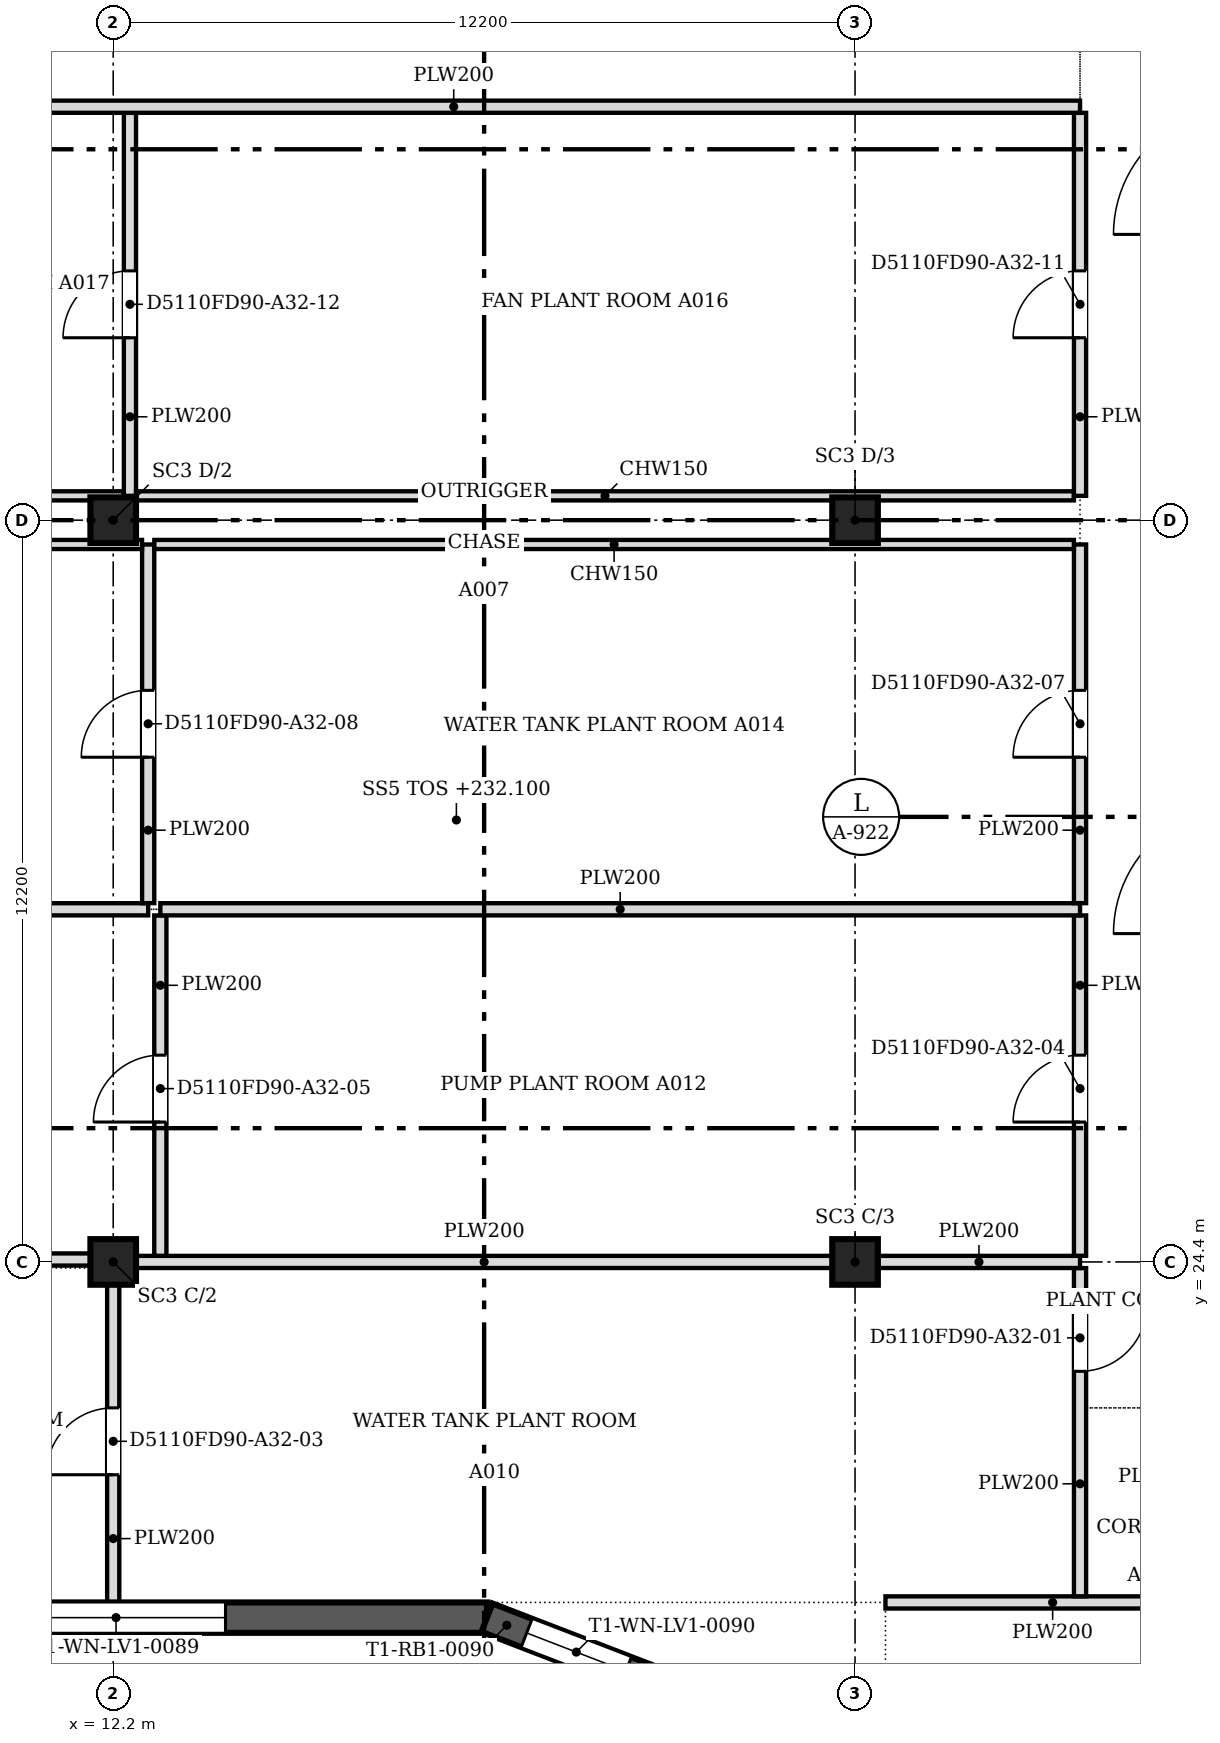
"""IFC4 building model, lengths in metres.
Left out: names, types, materials, properties, quantities, classifications, styles, units other than length and angle.
Written with IfcOpenShell. Run it as: python <this file> out.ifc"""

import sys

from ifc_helpers import new_model, si_unit, direction, frame, frame_2d, origin, origin_2d, place, context, subcontext, project, spatial, polyline, rectangle, outline, extrude, faceted_brep, source, transform, mapped, element, fill, save


model = new_model("IFC4")
c1 = context("Model", 3, precision=1e-05, world=origin(), true_north=direction((0.0, 1.0)))
c2 = subcontext(c1, "Body", "Model", "MODEL_VIEW")
j1 = project(units=[si_unit("LENGTHUNIT", "METRE"), si_unit("PLANEANGLEUNIT", "RADIAN")], contexts=[c1])
p1 = place(None, origin())
s1 = spatial("IfcSite", under=j1, at=p1, CompositionType="ELEMENT")
p2 = place(p1, origin())
s2 = spatial("IfcBuilding", under=s1, at=p2, CompositionType="ELEMENT")
p3 = place(p2, frame((0.0, 0.0, 232.1)))
s3 = spatial("IfcBuildingStorey", under=s2, at=p3, CompositionType="ELEMENT", Elevation=232.1)
for number, where, z_axis, x_axis in (
    (1, (12.2, 24.4, 0.0), (0.0, 0.0, 1.0), (1.0, 0.0, 0.0)),
    (2, (12.2, 36.6, 0.0), (0.0, 0.0, 1.0), (1.0, 0.0, 0.0)),
    (3, (24.4, 24.4, 0.0), (0.0, 0.0, 1.0), (1.0, 0.0, 0.0)),
    (4, (24.4, 36.6, 0.0), (0.0, 0.0, 1.0), (1.0, 0.0, 0.0)),
):
    element("IfcColumn", number, at=place(p3, frame(where, z_axis=z_axis, x_axis=x_axis)), inside=s3, PredefinedType="COLUMN", context=c2, shape_type="SweptSolid", body=[
        extrude(rectangle(XDim=0.75, YDim=0.75, at=origin_2d()), origin(), (0.0, 0.0, 1.0), 4.6),
    ])
m1 = source(origin(), c2, "Body", "Brep", [
    faceted_brep([(0.0, -0.25, 0.0), (12.154, -0.25, 0.0), (12.154, -0.25, 4.8), (0.0, -0.25, 4.8), (0.047, 0.25, 4.8), (12.2, 0.25, 4.8), (12.2, 0.25, 0.0), (0.047, 0.25, 0.0), (12.2, -0.0, 0.0), (0.0, 0.0, 0.0), (12.2, -0.0, 4.8), (0.0, 0.0, 4.8)], [[[0, 1, 2, 3]], [[4, 5, 6, 7]], [[7, 6, 8, 1, 0, 9]], [[6, 5, 10, 8]], [[5, 4, 11, 3, 2, 10]], [[9, 0, 3, 11]], [[7, 9, 11, 4]], [[1, 8, 10, 2]]]),
])
p4 = place(p3, frame((6.146, 18.55, 0.0), z_axis=(0.0, 0.0, 1.0), x_axis=(1.0, 0.0, 0.0)))
e5 = element("IfcWall", 5, at=p4, inside=s3, PredefinedType="SOLIDWALL", context=c2, shape_type="MappedRepresentation", body=[
    mapped(m1, transform((0.0, 0.0, 0.0), scale=1.0)),
])
m2 = source(origin(), c2, "Body", "SweptSolid", [
    extrude(outline(polyline([(4.3, 0.8), (7.9, 0.8), (7.9, 4.0), (4.3, 4.0), (4.3, 0.8)])), frame((0.0, 0.26, 0.0), z_axis=(0.0, -1.0, 0.0), x_axis=(1.0, 0.0, 0.0)), (0.0, 0.0, 1.0), 0.52),
])
p5 = place(p4, origin())
e6 = element("IfcOpeningElement", 6, at=p5, cuts=e5, PredefinedType="OPENING", context=c2, shape_type="MappedRepresentation", body=[
    mapped(m2, transform((0.0, 0.0, 0.0), scale=1.0)),
])
m3 = source(origin(), c2, "Body", "Brep", [
    faceted_brep([(0.047, -0.25, 0.0), (3.096, -0.25, 0.0), (3.096, -0.25, 4.8), (0.047, -0.25, 4.8), (0.0, 0.25, 4.8), (3.149, 0.25, 4.8), (3.149, 0.25, 0.0), (0.0, 0.25, 0.0), (3.149, -0.0, 0.0), (0.0, 0.0, 0.0), (3.149, -0.0, 4.8), (0.0, 0.0, 4.8)], [[[0, 1, 2, 3]], [[4, 5, 6, 7]], [[7, 6, 8, 1, 0, 9]], [[6, 5, 10, 8]], [[5, 4, 11, 3, 2, 10]], [[4, 7, 9, 11]], [[9, 0, 3, 11]], [[1, 8, 10, 2]]]),
])
p6 = place(p3, frame((18.346, 18.55, 0.0), z_axis=(0.0, 0.0, 1.0), x_axis=(0.932987528699, -0.35990869855, 0.0)))
e7 = element("IfcWall", 7, at=p6, inside=s3, PredefinedType="SOLIDWALL", context=c2, shape_type="MappedRepresentation", body=[
    mapped(m3, transform((0.0, 0.0, 0.0), scale=1.0)),
])
m4 = source(origin(), c2, "Body", "SweptSolid", [
    extrude(outline(polyline([(0.7, 0.8), (2.449, 0.8), (2.449, 4.0), (0.7, 4.0), (0.7, 0.8)])), frame((0.0, 0.26, 0.0), z_axis=(0.0, -1.0, 0.0), x_axis=(1.0, 0.0, 0.0)), (0.0, 0.0, 1.0), 0.52),
])
p7 = place(p6, origin())
e8 = element("IfcOpeningElement", 8, at=p7, cuts=e7, PredefinedType="OPENING", context=c2, shape_type="MappedRepresentation", body=[
    mapped(m4, transform((0.0, 0.0, 0.0), scale=1.0)),
])
p8 = place(p3, frame((12.2, 18.8, 0.0), z_axis=(0.0, 0.0, 1.0), x_axis=(0.0, 1.0, 0.0)))
e9 = element("IfcWall", 9, at=p8, inside=s3, PredefinedType="PARTITIONING", context=c2, shape_type="SweptSolid", body=[
    extrude(rectangle(XDim=5.224, YDim=0.2, at=frame_2d((2.612, 0.0))), origin(), (0.0, 0.0, 1.0), 3.817),
])
m5 = source(origin(), c2, "Body", "SweptSolid", [
    extrude(rectangle(XDim=1.1, YDim=2.1, at=frame_2d((0.55, 1.05))), frame((0.0, 0.11, 0.0), z_axis=(0.0, -1.0, 0.0), x_axis=(1.0, 0.0, 0.0)), (0.0, 0.0, 1.0), 0.22),
])
p9 = place(p8, frame((2.1, 0.0, 0.0)))
e10 = element("IfcOpeningElement", 10, at=p9, cuts=e9, PredefinedType="OPENING", context=c2, shape_type="MappedRepresentation", body=[
    mapped(m5, transform((0.0, 0.0, 0.0), scale=1.0)),
])
p10 = place(p3, frame((24.9, 18.8, 0.0), z_axis=(0.0, 0.0, 1.0), x_axis=(1.0, 0.0, 0.0)))
e11 = element("IfcWall", 11, at=p10, inside=s3, PredefinedType="PARTITIONING", context=c2, shape_type="SweptSolid", body=[
    extrude(rectangle(XDim=5.499, YDim=0.2, at=frame_2d((2.75, 0.0))), origin(), (0.0, 0.0, 1.0), 3.817),
])
p11 = place(p3, frame((28.1, 18.901, 0.0), z_axis=(0.0, 0.0, 1.0), x_axis=(0.0, 1.0, 0.0)))
e12 = element("IfcWall", 12, at=p11, inside=s3, PredefinedType="PARTITIONING", context=c2, shape_type="SweptSolid", body=[
    extrude(rectangle(XDim=5.398, YDim=0.2, at=frame_2d((2.699, 0.0))), origin(), (0.0, 0.0, 1.0), 3.817),
])
p12 = place(p11, frame((3.7, 0.0, 0.0)))
e13 = element("IfcOpeningElement", 13, at=p12, cuts=e12, PredefinedType="OPENING", context=c2, shape_type="MappedRepresentation", body=[
    mapped(m5, transform((0.0, 0.0, 0.0), scale=1.0)),
])
p13 = place(p3, frame((0.536, 24.44, 0.0), z_axis=(0.0, 0.0, 1.0), x_axis=(1.0, 0.0, 0.0)))
e14 = element("IfcWall", 14, at=p13, inside=s3, PredefinedType="PARTITIONING", context=c2, shape_type="SweptSolid", body=[
    extrude(rectangle(XDim=11.288, YDim=0.2, at=frame_2d((5.644, 0.0))), origin(), (0.0, 0.0, 1.0), 3.817),
])
p14 = place(p3, frame((12.576, 24.4, 0.0), z_axis=(0.0, 0.0, 1.0), x_axis=(1.0, 0.0, 0.0)))
e15 = element("IfcWall", 15, at=p14, inside=s3, PredefinedType="PARTITIONING", context=c2, shape_type="SweptSolid", body=[
    extrude(rectangle(XDim=11.448, YDim=0.2, at=frame_2d((5.724, 0.0))), origin(), (0.0, 0.0, 1.0), 3.817),
])
p15 = place(p3, frame((24.776, 24.4, 0.0), z_axis=(0.0, 0.0, 1.0), x_axis=(1.0, 0.0, 0.0)))
e16 = element("IfcWall", 16, at=p15, inside=s3, PredefinedType="PARTITIONING", context=c2, shape_type="SweptSolid", body=[
    extrude(rectangle(XDim=3.324, YDim=0.2, at=frame_2d((1.662, 0.0))), origin(), (0.0, 0.0, 1.0), 3.817),
])
p16 = place(p3, frame((12.975, 24.501, 0.0), z_axis=(0.0, 0.0, 1.0), x_axis=(0.0, 1.0, 0.0)))
e17 = element("IfcWall", 17, at=p16, inside=s3, PredefinedType="PARTITIONING", context=c2, shape_type="SweptSolid", body=[
    extrude(rectangle(XDim=5.598, YDim=0.2, at=frame_2d((2.799, 0.0))), origin(), (0.0, 0.0, 1.0), 3.817),
])
p17 = place(p16, frame((2.2, 0.0, 0.0)))
e18 = element("IfcOpeningElement", 18, at=p17, cuts=e17, PredefinedType="OPENING", context=c2, shape_type="MappedRepresentation", body=[
    mapped(m5, transform((0.0, 0.0, 0.0), scale=1.0)),
])
p18 = place(p3, frame((28.1, 24.501, 0.0), z_axis=(0.0, 0.0, 1.0), x_axis=(0.0, 1.0, 0.0)))
e19 = element("IfcWall", 19, at=p18, inside=s3, PredefinedType="PARTITIONING", context=c2, shape_type="SweptSolid", body=[
    extrude(rectangle(XDim=5.598, YDim=0.2, at=frame_2d((2.799, 0.0))), origin(), (0.0, 0.0, 1.0), 3.817),
])
p19 = place(p18, frame((2.2, 0.0, 0.0)))
e20 = element("IfcOpeningElement", 20, at=p19, cuts=e19, PredefinedType="OPENING", context=c2, shape_type="MappedRepresentation", body=[
    mapped(m5, transform((0.0, 0.0, 0.0), scale=1.0)),
])
p20 = place(p3, frame((0.5, 30.2, 0.0), z_axis=(0.0, 0.0, 1.0), x_axis=(1.0, 0.0, 0.0)))
e21 = element("IfcWall", 21, at=p20, inside=s3, PredefinedType="PARTITIONING", context=c2, shape_type="SweptSolid", body=[
    extrude(rectangle(XDim=12.275, YDim=0.2, at=frame_2d((6.137, 0.0))), origin(), (0.0, 0.0, 1.0), 3.817),
])
p21 = place(p3, frame((12.975, 30.2, 0.0), z_axis=(0.0, 0.0, 1.0), x_axis=(1.0, 0.0, 0.0)))
e22 = element("IfcWall", 22, at=p21, inside=s3, PredefinedType="PARTITIONING", context=c2, shape_type="SweptSolid", body=[
    extrude(rectangle(XDim=15.125, YDim=0.2, at=frame_2d((7.562, 0.0))), origin(), (0.0, 0.0, 1.0), 3.817),
])
p22 = place(p3, frame((12.775, 30.301, 0.0), z_axis=(0.0, 0.0, 1.0), x_axis=(0.0, 1.0, 0.0)))
e23 = element("IfcWall", 23, at=p22, inside=s3, PredefinedType="PARTITIONING", context=c2, shape_type="SweptSolid", body=[
    extrude(rectangle(XDim=5.899, YDim=0.2, at=frame_2d((2.949, 0.0))), origin(), (0.0, 0.0, 1.0), 3.817),
])
p23 = place(p22, frame((2.4, 0.0, 0.0)))
e24 = element("IfcOpeningElement", 24, at=p23, cuts=e23, PredefinedType="OPENING", context=c2, shape_type="MappedRepresentation", body=[
    mapped(m5, transform((0.0, 0.0, 0.0), scale=1.0)),
])
p24 = place(p3, frame((28.1, 30.301, 0.0), z_axis=(0.0, 0.0, 1.0), x_axis=(0.0, 1.0, 0.0)))
e25 = element("IfcWall", 25, at=p24, inside=s3, PredefinedType="PARTITIONING", context=c2, shape_type="SweptSolid", body=[
    extrude(rectangle(XDim=5.899, YDim=0.2, at=frame_2d((2.949, 0.0))), origin(), (0.0, 0.0, 1.0), 3.817),
])
p25 = place(p24, frame((2.4, 0.0, 0.0)))
e26 = element("IfcOpeningElement", 26, at=p25, cuts=e25, PredefinedType="OPENING", context=c2, shape_type="MappedRepresentation", body=[
    mapped(m5, transform((0.0, 0.0, 0.0), scale=1.0)),
])
p26 = place(p3, frame((0.5, 36.2, 0.0), z_axis=(0.0, 0.0, 1.0), x_axis=(1.0, 0.0, 0.0)))
e27 = element("IfcWall", 27, at=p26, inside=s3, PredefinedType="PARTITIONING", context=c2, shape_type="SweptSolid", body=[
    extrude(rectangle(XDim=12.174, YDim=0.15, at=frame_2d((6.087, 0.0))), origin(), (0.0, 0.0, 1.0), 3.817),
])
p27 = place(p3, frame((12.876, 36.2, 0.0), z_axis=(0.0, 0.0, 1.0), x_axis=(1.0, 0.0, 0.0)))
e28 = element("IfcWall", 28, at=p27, inside=s3, PredefinedType="PARTITIONING", context=c2, shape_type="SweptSolid", body=[
    extrude(rectangle(XDim=15.123, YDim=0.15, at=frame_2d((7.562, 0.0))), origin(), (0.0, 0.0, 1.0), 3.817),
])
p28 = place(p3, frame((0.5, 37.0, 0.0), z_axis=(0.0, 0.0, 1.0), x_axis=(1.0, 0.0, 0.0)))
e29 = element("IfcWall", 29, at=p28, inside=s3, PredefinedType="PARTITIONING", context=c2, shape_type="SweptSolid", body=[
    extrude(rectangle(XDim=11.874, YDim=0.15, at=frame_2d((5.937, 0.0))), origin(), (0.0, 0.0, 1.0), 3.817),
])
p29 = place(p3, frame((12.475, 37.0, 0.0), z_axis=(0.0, 0.0, 1.0), x_axis=(0.0, 1.0, 0.0)))
e30 = element("IfcWall", 30, at=p29, inside=s3, PredefinedType="PARTITIONING", context=c2, shape_type="SweptSolid", body=[
    extrude(rectangle(XDim=6.299, YDim=0.2, at=frame_2d((3.149, 0.0))), origin(), (0.0, 0.0, 1.0), 3.817),
])
p30 = place(p29, frame((2.6, 0.0, 0.0)))
e31 = element("IfcOpeningElement", 31, at=p30, cuts=e30, PredefinedType="OPENING", context=c2, shape_type="MappedRepresentation", body=[
    mapped(m5, transform((0.0, 0.0, 0.0), scale=1.0)),
])
p31 = place(p3, frame((12.576, 37.0, 0.0), z_axis=(0.0, 0.0, 1.0), x_axis=(1.0, 0.0, 0.0)))
e32 = element("IfcWall", 32, at=p31, inside=s3, PredefinedType="PARTITIONING", context=c2, shape_type="SweptSolid", body=[
    extrude(rectangle(XDim=15.423, YDim=0.15, at=frame_2d((7.711, 0.0))), origin(), (0.0, 0.0, 1.0), 3.817),
])
p32 = place(p3, frame((28.1, 37.0, 0.0), z_axis=(0.0, 0.0, 1.0), x_axis=(0.0, 1.0, 0.0)))
e33 = element("IfcWall", 33, at=p32, inside=s3, PredefinedType="PARTITIONING", context=c2, shape_type="SweptSolid", body=[
    extrude(rectangle(XDim=6.299, YDim=0.2, at=frame_2d((3.149, 0.0))), origin(), (0.0, 0.0, 1.0), 3.817),
])
p33 = place(p32, frame((2.6, 0.0, 0.0)))
e34 = element("IfcOpeningElement", 34, at=p33, cuts=e33, PredefinedType="OPENING", context=c2, shape_type="MappedRepresentation", body=[
    mapped(m5, transform((0.0, 0.0, 0.0), scale=1.0)),
])
p34 = place(p3, frame((7.5, 43.4, 0.0), z_axis=(0.0, 0.0, 1.0), x_axis=(1.0, 0.0, 0.0)))
e35 = element("IfcWall", 35, at=p34, inside=s3, PredefinedType="PARTITIONING", context=c2, shape_type="SweptSolid", body=[
    extrude(rectangle(XDim=20.6, YDim=0.2, at=frame_2d((10.3, 0.0))), origin(), (0.0, 0.0, 1.0), 3.817),
])
m6 = source(origin(), c2, "Body", "SweptSolid", [
    extrude(outline(polyline([(4.3, 0.8), (7.9, 0.8), (7.9, 4.0), (4.3, 4.0), (4.3, 0.8)])), frame((0.0, 0.03, 0.0), z_axis=(0.0, -1.0, 0.0), x_axis=(1.0, 0.0, 0.0)), (0.0, 0.0, 1.0), 0.06),
])
p35 = place(p5, origin())
e36 = element("IfcWindow", 36, at=p35, inside=s3, PartitioningType="USERDEFINED", PredefinedType="WINDOW", context=c2, shape_type="MappedRepresentation", body=[
    mapped(m6, transform((0.0, 0.0, 0.0), scale=1.0)),
])
fill(e6, e36)
m7 = source(origin(), c2, "Body", "SweptSolid", [
    extrude(outline(polyline([(0.7, 0.8), (2.449, 0.8), (2.449, 4.0), (0.7, 4.0), (0.7, 0.8)])), frame((0.0, 0.03, 0.0), z_axis=(0.0, -1.0, 0.0), x_axis=(1.0, 0.0, 0.0)), (0.0, 0.0, 1.0), 0.06),
])
p36 = place(p7, origin())
e37 = element("IfcWindow", 37, at=p36, inside=s3, PartitioningType="USERDEFINED", PredefinedType="WINDOW", context=c2, shape_type="MappedRepresentation", body=[
    mapped(m7, transform((0.0, 0.0, 0.0), scale=1.0)),
])
fill(e8, e37)
m8 = source(origin(), c2, "Body", "SweptSolid", [
    extrude(rectangle(XDim=1.1, YDim=2.1, at=frame_2d((0.55, 1.05))), frame((0.0, 0.025, 0.0), z_axis=(0.0, -1.0, 0.0), x_axis=(1.0, 0.0, 0.0)), (0.0, 0.0, 1.0), 0.05),
])
p37 = place(p12, origin())
e38 = element("IfcDoor", 38, at=p37, inside=s3, OperationType="SINGLE_SWING_RIGHT", PredefinedType="DOOR", context=c2, shape_type="MappedRepresentation", body=[
    mapped(m8, transform((0.0, 0.0, 0.0), scale=1.0)),
])
fill(e13, e38)
p38 = place(p9, origin())
e39 = element("IfcDoor", 39, at=p38, inside=s3, OperationType="SINGLE_SWING_LEFT", PredefinedType="DOOR", context=c2, shape_type="MappedRepresentation", body=[
    mapped(m8, transform((0.0, 0.0, 0.0), scale=1.0)),
])
fill(e10, e39)
p39 = place(p19, origin())
e40 = element("IfcDoor", 40, at=p39, inside=s3, OperationType="SINGLE_SWING_LEFT", PredefinedType="DOOR", context=c2, shape_type="MappedRepresentation", body=[
    mapped(m8, transform((0.0, 0.0, 0.0), scale=1.0)),
])
fill(e20, e40)
p40 = place(p17, origin())
e41 = element("IfcDoor", 41, at=p40, inside=s3, OperationType="SINGLE_SWING_LEFT", PredefinedType="DOOR", context=c2, shape_type="MappedRepresentation", body=[
    mapped(m8, transform((0.0, 0.0, 0.0), scale=1.0)),
])
fill(e18, e41)
p41 = place(p25, origin())
e42 = element("IfcDoor", 42, at=p41, inside=s3, OperationType="SINGLE_SWING_LEFT", PredefinedType="DOOR", context=c2, shape_type="MappedRepresentation", body=[
    mapped(m8, transform((0.0, 0.0, 0.0), scale=1.0)),
])
fill(e26, e42)
p42 = place(p23, origin())
e43 = element("IfcDoor", 43, at=p42, inside=s3, OperationType="SINGLE_SWING_LEFT", PredefinedType="DOOR", context=c2, shape_type="MappedRepresentation", body=[
    mapped(m8, transform((0.0, 0.0, 0.0), scale=1.0)),
])
fill(e24, e43)
p43 = place(p33, origin())
e44 = element("IfcDoor", 44, at=p43, inside=s3, OperationType="SINGLE_SWING_LEFT", PredefinedType="DOOR", context=c2, shape_type="MappedRepresentation", body=[
    mapped(m8, transform((0.0, 0.0, 0.0), scale=1.0)),
])
fill(e34, e44)
p44 = place(p30, origin())
e45 = element("IfcDoor", 45, at=p44, inside=s3, OperationType="SINGLE_SWING_LEFT", PredefinedType="DOOR", context=c2, shape_type="MappedRepresentation", body=[
    mapped(m8, transform((0.0, 0.0, 0.0), scale=1.0)),
])
fill(e31, e45)
save(model, sys.argv[1])
